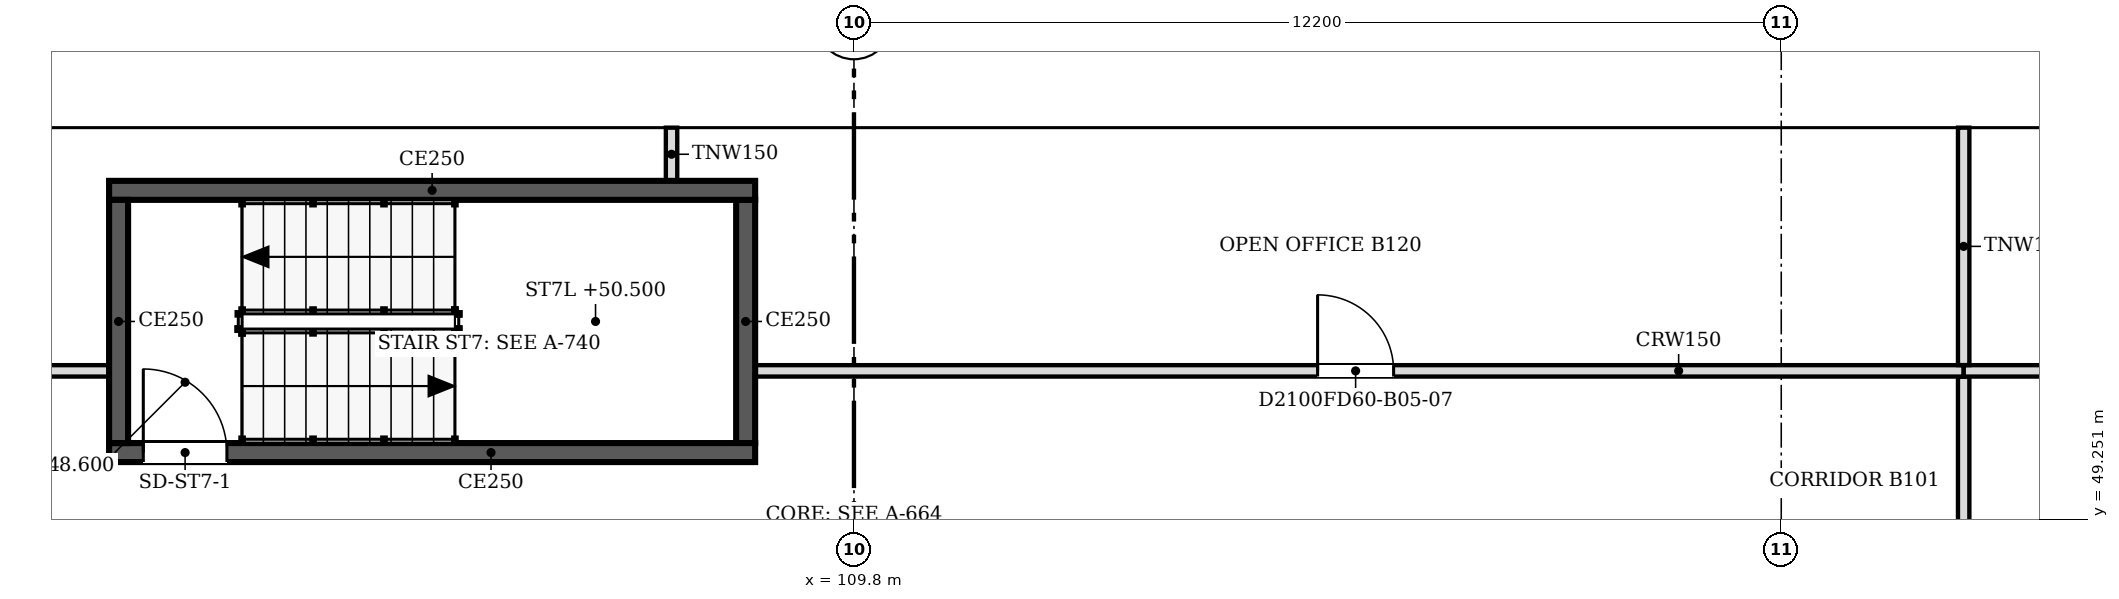
"""IFC4 building model, lengths in metres.
Left out: names, types, materials, properties, quantities, classifications, styles, units other than length and angle.
Written with IfcOpenShell. Run it as: python <this file> out.ifc"""

import sys

from ifc_helpers import new_model, si_unit, direction, frame, frame_2d, origin, place, context, subcontext, project, spatial, polyline, rectangle, outline, extrude, faceted_brep, source, transform, mapped, element, fill, save


model = new_model("IFC4")
c1 = context("Model", 3, precision=1e-05, world=origin(), true_north=direction((0.0, 1.0)))
c2 = subcontext(c1, "Body", "Model", "MODEL_VIEW")
j1 = project(units=[si_unit("LENGTHUNIT", "METRE"), si_unit("PLANEANGLEUNIT", "RADIAN")], contexts=[c1])
p1 = place(None, origin())
s1 = spatial("IfcSite", under=j1, at=p1, CompositionType="ELEMENT")
p2 = place(p1, origin())
s2 = spatial("IfcBuilding", under=s1, at=p2, CompositionType="ELEMENT")
p3 = place(p2, frame((0.0, 0.0, 48.6)))
s3 = spatial("IfcBuildingStorey", under=s2, at=p3, CompositionType="ELEMENT", Elevation=48.6)
m1 = source(origin(), c2, "Body", "Brep", [
    faceted_brep([(0.047, -0.25, 0.0), (3.05, -0.25, 3.8), (0.047, -0.25, 7.6), (0.0, -0.25, 7.54), (0.0, -0.25, 0.06), (0.093, 0.25, 7.541), (3.05, 0.25, 3.8), (0.093, 0.25, 0.059), (0.047, 0.0, 0.0), (0.047, 0.0, 7.6)], [[[0, 1, 2, 3, 4]], [[5, 6, 7]], [[7, 6, 1, 0, 8]], [[6, 5, 9, 2, 1]], [[3, 2, 9]], [[8, 0, 4]], [[7, 8, 4, 3, 9, 5]]]),
])
p4 = place(p3, frame((128.1, 54.65, -3.8), z_axis=(0.0, 0.0, 1.0), x_axis=(-1.0, 0.0, 0.0)))
e1 = element("IfcWall", 1, at=p4, inside=s3, PredefinedType="SOLIDWALL", context=c2, shape_type="MappedRepresentation", body=[
    mapped(m1, transform((0.0, 0.0, 0.0), scale=1.0)),
])
m2 = source(origin(), c2, "Body", "SweptSolid", [
    extrude(outline(polyline([(0.247, 0.656), (2.731, 3.8), (0.247, 6.944), (0.247, 0.656)])), frame((0.0, 0.26, 0.0), z_axis=(0.0, -1.0, 0.0), x_axis=(1.0, 0.0, 0.0)), (0.0, 0.0, 1.0), 0.52),
])
p5 = place(p4, origin())
e2 = element("IfcOpeningElement", 2, at=p5, cuts=e1, PredefinedType="OPENING", context=c2, shape_type="MappedRepresentation", body=[
    mapped(m2, transform((0.0, 0.0, 0.0), scale=1.0)),
])
m3 = source(origin(), c2, "Body", "SweptSolid", [
    extrude(outline(polyline([(3.05, 0.0), (6.1, 3.8), (3.05, 7.6), (0.0, 3.8), (3.05, 0.0)])), frame((0.0, 0.25, 0.0), z_axis=(0.0, -1.0, 0.0), x_axis=(1.0, 0.0, 0.0)), (0.0, 0.0, 1.0), 0.5),
])
p6 = place(p3, frame((125.05, 54.65, -3.8), z_axis=(0.0, 0.0, 1.0), x_axis=(-1.0, 0.0, 0.0)))
e3 = element("IfcWall", 3, at=p6, inside=s3, PredefinedType="SOLIDWALL", context=c2, shape_type="MappedRepresentation", body=[
    mapped(m3, transform((0.0, 0.0, 0.0), scale=1.0)),
])
m4 = source(origin(), c2, "Body", "SweptSolid", [
    extrude(outline(polyline([(3.05, 0.399), (5.78, 3.8), (3.05, 7.2), (0.321, 3.8), (3.05, 0.399)])), frame((0.0, 0.26, 0.0), z_axis=(0.0, -1.0, 0.0), x_axis=(1.0, 0.0, 0.0)), (0.0, 0.0, 1.0), 0.52),
])
p7 = place(p6, origin())
e4 = element("IfcOpeningElement", 4, at=p7, cuts=e3, PredefinedType="OPENING", context=c2, shape_type="MappedRepresentation", body=[
    mapped(m4, transform((0.0, 0.0, 0.0), scale=1.0)),
])
m5 = source(origin(), c2, "Body", "Brep", [
    faceted_brep([(3.05, -0.25, 0.0), (6.1, -0.25, 3.8), (6.1, -0.25, 3.8), (3.05, -0.25, 7.6), (0.0, -0.25, 3.8), (0.0, 0.25, 3.8), (3.05, 0.25, 7.6), (6.1, 0.25, 3.8), (6.1, 0.25, 3.8), (3.05, 0.25, 0.0)], [[[0, 1, 2, 3, 4]], [[5, 6, 7, 8, 9]], [[9, 8, 1, 0]], [[7, 6, 3, 2]], [[6, 5, 4, 3]], [[5, 9, 0, 4]], [[1, 8, 7, 2]]]),
])
p8 = place(p3, frame((118.95, 54.65, -3.8), z_axis=(0.0, 0.0, 1.0), x_axis=(-1.0, 0.0, 0.0)))
e5 = element("IfcWall", 5, at=p8, inside=s3, PredefinedType="SOLIDWALL", context=c2, shape_type="MappedRepresentation", body=[
    mapped(m5, transform((0.0, 0.0, 0.0), scale=1.0)),
])
p9 = place(p8, origin())
e6 = element("IfcOpeningElement", 6, at=p9, cuts=e5, PredefinedType="OPENING", context=c2, shape_type="MappedRepresentation", body=[
    mapped(m4, transform((0.0, 0.0, 0.0), scale=1.0)),
])
p10 = place(p3, frame((112.85, 54.65, -3.8), z_axis=(0.0, 0.0, 1.0), x_axis=(-1.0, 0.0, 0.0)))
e7 = element("IfcWall", 7, at=p10, inside=s3, PredefinedType="SOLIDWALL", context=c2, shape_type="MappedRepresentation", body=[
    mapped(m3, transform((0.0, 0.0, 0.0), scale=1.0)),
])
p11 = place(p10, origin())
e8 = element("IfcOpeningElement", 8, at=p11, cuts=e7, PredefinedType="OPENING", context=c2, shape_type="MappedRepresentation", body=[
    mapped(m4, transform((0.0, 0.0, 0.0), scale=1.0)),
])
p12 = place(p3, frame((106.75, 54.65, -3.8), z_axis=(0.0, 0.0, 1.0), x_axis=(-1.0, 0.0, 0.0)))
e9 = element("IfcWall", 9, at=p12, inside=s3, PredefinedType="SOLIDWALL", context=c2, shape_type="MappedRepresentation", body=[
    mapped(m3, transform((0.0, 0.0, 0.0), scale=1.0)),
])
p13 = place(p12, origin())
e10 = element("IfcOpeningElement", 10, at=p13, cuts=e9, PredefinedType="OPENING", context=c2, shape_type="MappedRepresentation", body=[
    mapped(m4, transform((0.0, 0.0, 0.0), scale=1.0)),
])
p14 = place(p3, frame((100.65, 54.65, -3.8), z_axis=(0.0, 0.0, 1.0), x_axis=(-1.0, 0.0, 0.0)))
e11 = element("IfcWall", 11, at=p14, inside=s3, PredefinedType="SOLIDWALL", context=c2, shape_type="MappedRepresentation", body=[
    mapped(m5, transform((0.0, 0.0, 0.0), scale=1.0)),
])
p15 = place(p14, origin())
e12 = element("IfcOpeningElement", 12, at=p15, cuts=e11, PredefinedType="OPENING", context=c2, shape_type="MappedRepresentation", body=[
    mapped(m4, transform((0.0, 0.0, 0.0), scale=1.0)),
])
p16 = place(p2, frame((0.0, 0.0, 52.4)))
s4 = spatial("IfcBuildingStorey", under=s2, at=p16, CompositionType="ELEMENT", Elevation=52.4)
m6 = source(origin(), c2, "Body", "Brep", [
    faceted_brep([(3.003, -0.25, 0.0), (6.053, -0.25, 3.8), (3.003, -0.25, 7.6), (0.0, -0.25, 3.8), (0.047, 0.25, 3.859), (3.003, 0.25, 7.6), (6.053, 0.25, 3.8), (3.003, 0.25, 0.0), (0.047, 0.25, 3.741), (0.0, 0.0, 3.8)], [[[0, 1, 2, 3]], [[4, 5, 6, 7, 8]], [[7, 6, 1, 0]], [[6, 5, 2, 1]], [[5, 4, 9, 3, 2]], [[8, 7, 0, 3, 9]], [[8, 9, 4]]]),
])
p17 = place(p16, frame((128.053, 54.65, -3.8), z_axis=(0.0, 0.0, 1.0), x_axis=(-1.0, 0.0, 0.0)))
e13 = element("IfcWall", 13, at=p17, inside=s4, PredefinedType="SOLIDWALL", context=c2, shape_type="MappedRepresentation", body=[
    mapped(m6, transform((0.0, 0.0, 0.0), scale=1.0)),
])
m7 = source(origin(), c2, "Body", "SweptSolid", [
    extrude(outline(polyline([(3.005, 0.401), (5.733, 3.8), (3.005, 7.199), (0.319, 3.8), (3.005, 0.401)])), frame((0.0, 0.26, 0.0), z_axis=(0.0, -1.0, 0.0), x_axis=(1.0, 0.0, 0.0)), (0.0, 0.0, 1.0), 0.52),
])
p18 = place(p17, origin())
e14 = element("IfcOpeningElement", 14, at=p18, cuts=e13, PredefinedType="OPENING", context=c2, shape_type="MappedRepresentation", body=[
    mapped(m7, transform((0.0, 0.0, 0.0), scale=1.0)),
])
m8 = source(origin(), c2, "Body", "SweptSolid", [
    extrude(outline(polyline([(3.05, 0.0), (6.1, 3.8), (3.05, 7.6), (0.0, 3.8), (3.05, 0.0)])), frame((0.0, 0.25, 0.0), z_axis=(0.0, -1.0, 0.0), x_axis=(1.0, 0.0, 0.0)), (0.0, 0.0, 1.0), 0.5),
])
p19 = place(p16, frame((122.0, 54.65, -3.8), z_axis=(0.0, 0.0, 1.0), x_axis=(-1.0, 0.0, 0.0)))
e15 = element("IfcWall", 15, at=p19, inside=s4, PredefinedType="SOLIDWALL", context=c2, shape_type="MappedRepresentation", body=[
    mapped(m8, transform((0.0, 0.0, 0.0), scale=1.0)),
])
m9 = source(origin(), c2, "Body", "SweptSolid", [
    extrude(outline(polyline([(3.05, 0.399), (5.78, 3.8), (3.05, 7.2), (0.321, 3.8), (3.05, 0.399)])), frame((0.0, 0.26, 0.0), z_axis=(0.0, -1.0, 0.0), x_axis=(1.0, 0.0, 0.0)), (0.0, 0.0, 1.0), 0.52),
])
p20 = place(p19, origin())
e16 = element("IfcOpeningElement", 16, at=p20, cuts=e15, PredefinedType="OPENING", context=c2, shape_type="MappedRepresentation", body=[
    mapped(m9, transform((0.0, 0.0, 0.0), scale=1.0)),
])
m10 = source(origin(), c2, "Body", "Brep", [
    faceted_brep([(3.05, -0.25, 0.0), (6.1, -0.25, 3.8), (6.1, -0.25, 3.8), (3.05, -0.25, 7.6), (0.0, -0.25, 3.8), (0.0, 0.25, 3.8), (3.05, 0.25, 7.6), (6.1, 0.25, 3.8), (6.1, 0.25, 3.8), (3.05, 0.25, 0.0)], [[[0, 1, 2, 3, 4]], [[5, 6, 7, 8, 9]], [[9, 8, 1, 0]], [[7, 6, 3, 2]], [[6, 5, 4, 3]], [[5, 9, 0, 4]], [[1, 8, 7, 2]]]),
])
p21 = place(p16, frame((115.9, 54.65, -3.8), z_axis=(0.0, 0.0, 1.0), x_axis=(-1.0, 0.0, 0.0)))
e17 = element("IfcWall", 17, at=p21, inside=s4, PredefinedType="SOLIDWALL", context=c2, shape_type="MappedRepresentation", body=[
    mapped(m10, transform((0.0, 0.0, 0.0), scale=1.0)),
])
p22 = place(p21, origin())
e18 = element("IfcOpeningElement", 18, at=p22, cuts=e17, PredefinedType="OPENING", context=c2, shape_type="MappedRepresentation", body=[
    mapped(m9, transform((0.0, 0.0, 0.0), scale=1.0)),
])
p23 = place(p16, frame((109.8, 54.65, -3.8), z_axis=(0.0, 0.0, 1.0), x_axis=(-1.0, 0.0, 0.0)))
e19 = element("IfcWall", 19, at=p23, inside=s4, PredefinedType="SOLIDWALL", context=c2, shape_type="MappedRepresentation", body=[
    mapped(m8, transform((0.0, 0.0, 0.0), scale=1.0)),
])
p24 = place(p23, origin())
e20 = element("IfcOpeningElement", 20, at=p24, cuts=e19, PredefinedType="OPENING", context=c2, shape_type="MappedRepresentation", body=[
    mapped(m9, transform((0.0, 0.0, 0.0), scale=1.0)),
])
p25 = place(p16, frame((103.7, 54.65, -3.8), z_axis=(0.0, 0.0, 1.0), x_axis=(-1.0, 0.0, 0.0)))
e21 = element("IfcWall", 21, at=p25, inside=s4, PredefinedType="SOLIDWALL", context=c2, shape_type="MappedRepresentation", body=[
    mapped(m10, transform((0.0, 0.0, 0.0), scale=1.0)),
])
p26 = place(p25, origin())
e22 = element("IfcOpeningElement", 22, at=p26, cuts=e21, PredefinedType="OPENING", context=c2, shape_type="MappedRepresentation", body=[
    mapped(m9, transform((0.0, 0.0, 0.0), scale=1.0)),
])
p27 = place(p3, frame((108.5, 50.125, 0.0), z_axis=(0.0, 0.0, 1.0), x_axis=(-1.0, 0.0, 0.0)))
e23 = element("IfcWall", 23, at=p27, inside=s3, PredefinedType="SOLIDWALL", context=c2, shape_type="SweptSolid", body=[
    extrude(rectangle(XDim=8.5, YDim=0.25, at=frame_2d((4.25, 0.0))), origin(), (0.0, 0.0, 1.0), 3.8),
])
m11 = source(origin(), c2, "Body", "SweptSolid", [
    extrude(rectangle(XDim=1.1, YDim=2.1, at=frame_2d((0.55, 1.05))), frame((0.0, 0.135, 0.0), z_axis=(0.0, -1.0, 0.0), x_axis=(1.0, 0.0, 0.0)), (0.0, 0.0, 1.0), 0.27),
])
p28 = place(p27, frame((6.95, 0.0, 0.0)))
e24 = element("IfcOpeningElement", 24, at=p28, cuts=e23, PredefinedType="OPENING", context=c2, shape_type="MappedRepresentation", body=[
    mapped(m11, transform((0.0, 0.0, 0.0), scale=1.0)),
])
p29 = place(p3, frame((100.125, 50.25, 0.0), z_axis=(0.0, 0.0, 1.0), x_axis=(0.0, 1.0, 0.0)))
e25 = element("IfcWall", 25, at=p29, inside=s3, PredefinedType="SOLIDWALL", context=c2, shape_type="SweptSolid", body=[
    extrude(rectangle(XDim=3.2, YDim=0.25, at=frame_2d((1.6, 0.0))), origin(), (0.0, 0.0, 1.0), 3.8),
])
p30 = place(p3, frame((100.0, 53.575, 0.0), z_axis=(0.0, 0.0, 1.0), x_axis=(1.0, 0.0, 0.0)))
e26 = element("IfcWall", 26, at=p30, inside=s3, PredefinedType="SOLIDWALL", context=c2, shape_type="SweptSolid", body=[
    extrude(rectangle(XDim=8.5, YDim=0.25, at=frame_2d((4.25, 0.0))), origin(), (0.0, 0.0, 1.0), 3.8),
])
p31 = place(p3, frame((108.375, 53.45, 0.0), z_axis=(0.0, 0.0, 1.0), x_axis=(0.0, -1.0, 0.0)))
e27 = element("IfcWall", 27, at=p31, inside=s3, PredefinedType="SOLIDWALL", context=c2, shape_type="SweptSolid", body=[
    extrude(rectangle(XDim=3.2, YDim=0.25, at=frame_2d((1.6, 0.0))), origin(), (0.0, 0.0, 1.0), 3.8),
])
p32 = place(p3, frame((124.4, 51.124, 0.0), z_axis=(0.0, 0.0, 1.0), x_axis=(0.0, -1.0, 0.0)))
e28 = element("IfcWall", 28, at=p32, inside=s3, PredefinedType="PARTITIONING", context=c2, shape_type="SweptSolid", body=[
    extrude(rectangle(XDim=14.524, YDim=0.15, at=frame_2d((7.262, 0.0))), origin(), (0.0, 0.0, 1.0), 3.067),
])
m12 = source(origin(), c2, "Body", "SweptSolid", [
    extrude(rectangle(XDim=1.0, YDim=2.1, at=frame_2d((0.5, 1.05))), frame((0.0, 0.085, 0.0), z_axis=(0.0, -1.0, 0.0), x_axis=(1.0, 0.0, 0.0)), (0.0, 0.0, 1.0), 0.17),
])
p33 = place(p32, frame((3.724, 0.0, 0.0)))
e29 = element("IfcOpeningElement", 29, at=p33, cuts=e28, PredefinedType="OPENING", context=c2, shape_type="MappedRepresentation", body=[
    mapped(m12, transform((0.0, 0.0, 0.0), scale=1.0)),
])
p34 = place(p3, frame((95.276, 51.2, 0.0), z_axis=(0.0, 0.0, 1.0), x_axis=(1.0, 0.0, 0.0)))
e30 = element("IfcWall", 30, at=p34, inside=s3, PredefinedType="PARTITIONING", context=c2, shape_type="SweptSolid", body=[
    extrude(rectangle(XDim=4.724, YDim=0.15, at=frame_2d((2.362, 0.0))), origin(), (0.0, 0.0, 1.0), 3.067),
])
p35 = place(p34, frame((1.9, 0.0, 0.0)))
e31 = element("IfcOpeningElement", 31, at=p35, cuts=e30, PredefinedType="OPENING", context=c2, shape_type="MappedRepresentation", body=[
    mapped(m12, transform((0.0, 0.0, 0.0), scale=1.0)),
])
p36 = place(p3, frame((108.5, 51.2, 0.0), z_axis=(0.0, 0.0, 1.0), x_axis=(1.0, 0.0, 0.0)))
e32 = element("IfcWall", 32, at=p36, inside=s3, PredefinedType="PARTITIONING", context=c2, shape_type="SweptSolid", body=[
    extrude(rectangle(XDim=15.9, YDim=0.15, at=frame_2d((7.95, 0.0))), origin(), (0.0, 0.0, 1.0), 3.067),
])
p37 = place(p36, frame((7.4, 0.0, 0.0)))
e33 = element("IfcOpeningElement", 33, at=p37, cuts=e32, PredefinedType="OPENING", context=c2, shape_type="MappedRepresentation", body=[
    mapped(m12, transform((0.0, 0.0, 0.0), scale=1.0)),
])
p38 = place(p3, frame((124.401, 51.2, 0.0), z_axis=(0.0, 0.0, 1.0), x_axis=(1.0, 0.0, 0.0)))
e34 = element("IfcWall", 34, at=p38, inside=s3, PredefinedType="PARTITIONING", context=c2, shape_type="SweptSolid", body=[
    extrude(rectangle(XDim=4.549, YDim=0.15, at=frame_2d((2.274, 0.0))), origin(), (0.0, 0.0, 1.0), 3.067),
])
m13 = source(origin(), c2, "Body", "SweptSolid", [
    extrude(rectangle(XDim=0.9, YDim=2.1, at=frame_2d((0.45, 1.05))), frame((0.0, 0.085, 0.0), z_axis=(0.0, -1.0, 0.0), x_axis=(1.0, 0.0, 0.0)), (0.0, 0.0, 1.0), 0.17),
])
p39 = place(p38, frame((1.8, 0.0, 0.0)))
e35 = element("IfcOpeningElement", 35, at=p39, cuts=e34, PredefinedType="OPENING", context=c2, shape_type="MappedRepresentation", body=[
    mapped(m13, transform((0.0, 0.0, 0.0), scale=1.0)),
])
p40 = place(p3, frame((124.4, 51.276, 0.0), z_axis=(0.0, 0.0, 1.0), x_axis=(0.0, 1.0, 0.0)))
e36 = element("IfcWall", 36, at=p40, inside=s3, PredefinedType="PARTITIONING", context=c2, shape_type="SweptSolid", body=[
    extrude(rectangle(XDim=3.124, YDim=0.15, at=frame_2d((1.562, 0.0))), origin(), (0.0, 0.0, 1.0), 3.067),
])
p41 = place(p3, frame((107.4, 53.7, 0.0), z_axis=(0.0, 0.0, 1.0), x_axis=(0.0, 1.0, 0.0)))
e37 = element("IfcWall", 37, at=p41, inside=s3, PredefinedType="PARTITIONING", context=c2, shape_type="SweptSolid", body=[
    extrude(rectangle(XDim=0.7, YDim=0.15, at=frame_2d((0.35, 0.0))), origin(), (0.0, 0.0, 1.0), 3.067),
])
m14 = source(origin(), c2, "Body", "SweptSolid", [
    extrude(rectangle(XDim=1.1, YDim=2.1, at=frame_2d((0.55, 1.05))), frame((0.0, 0.025, 0.0), z_axis=(0.0, -1.0, 0.0), x_axis=(1.0, 0.0, 0.0)), (0.0, 0.0, 1.0), 0.05),
])
p42 = place(p28, origin())
e38 = element("IfcDoor", 38, at=p42, inside=s3, OperationType="SINGLE_SWING_RIGHT", PredefinedType="DOOR", context=c2, shape_type="MappedRepresentation", body=[
    mapped(m14, transform((0.0, 0.0, 0.0), scale=1.0)),
])
fill(e24, e38)
m15 = source(origin(), c2, "Body", "SweptSolid", [
    extrude(rectangle(XDim=1.0, YDim=2.1, at=frame_2d((0.5, 1.05))), frame((0.0, 0.025, 0.0), z_axis=(0.0, -1.0, 0.0), x_axis=(1.0, 0.0, 0.0)), (0.0, 0.0, 1.0), 0.05),
])
p43 = place(p37, origin())
e39 = element("IfcDoor", 39, at=p43, inside=s3, OperationType="SINGLE_SWING_LEFT", PredefinedType="DOOR", context=c2, shape_type="MappedRepresentation", body=[
    mapped(m15, transform((0.0, 0.0, 0.0), scale=1.0)),
])
fill(e33, e39)
save(model, sys.argv[1])
